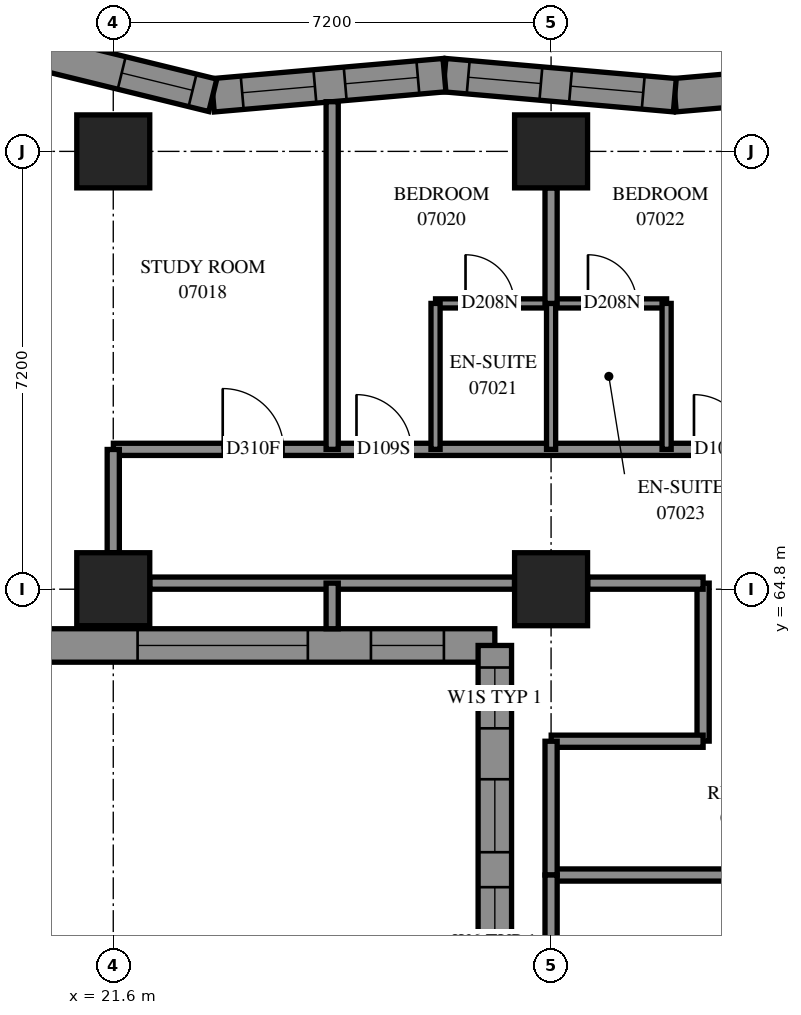
"""IFC4 building model, lengths in metres.
Left out: names, types, materials, properties, quantities, classifications, styles, units other than length and angle.
Written with IfcOpenShell. Run it as: python <this file> out.ifc"""

import sys

from ifc_helpers import new_model, si_unit, direction, frame, frame_2d, origin, origin_2d, place, context, subcontext, project, spatial, polyline, rectangle, outline, extrude, element, fill, save


model = new_model("IFC4")
c1 = context("Model", 3, precision=1e-05, world=origin(), true_north=direction((0.0, 1.0)))
c2 = subcontext(c1, "Body", "Model", "MODEL_VIEW")
j1 = project(units=[si_unit("LENGTHUNIT", "METRE"), si_unit("PLANEANGLEUNIT", "RADIAN")], contexts=[c1])
p1 = place(None, origin())
s1 = spatial("IfcSite", under=j1, at=p1, CompositionType="ELEMENT")
p2 = place(p1, origin())
s2 = spatial("IfcBuilding", under=s1, at=p2, CompositionType="ELEMENT")
p3 = place(p2, frame((0.0, 0.0, 30.4)))
s3 = spatial("IfcBuildingStorey", under=s2, at=p3, CompositionType="ELEMENT", Elevation=30.4)
for number, where, z_axis, x_axis in (
    (1, (21.6, 64.8, 0.0), (0.0, 0.0, 1.0), (1.0, 0.0, 0.0)),
    (2, (21.6, 72.0, 0.0), (0.0, 0.0, 1.0), (1.0, 0.0, 0.0)),
    (3, (28.8, 64.8, 0.0), (0.0, 0.0, 1.0), (1.0, 0.0, 0.0)),
    (4, (28.8, 72.0, 0.0), (0.0, 0.0, 1.0), (1.0, 0.0, 0.0)),
):
    element("IfcColumn", number, at=place(p3, frame(where, z_axis=z_axis, x_axis=x_axis)), inside=s3, PredefinedType="COLUMN", context=c2, shape_type="SweptSolid", body=[
        extrude(rectangle(XDim=1.2, YDim=1.2, at=origin_2d()), origin(), (0.0, 0.0, 1.0), 3.1),
    ])
p4 = place(p3, frame((34.623, 73.254, 0.0), z_axis=(0.0, 0.0, 1.0), x_axis=(-0.9962273538, -0.0867816769, 0.0)))
e5 = element("IfcWall", 5, at=p4, inside=s3, PredefinedType="SOLIDWALL", context=c2, shape_type="SweptSolid", body=[
    extrude(outline(polyline([(-0.024, -0.275), (3.779, -0.275), (3.827, 0.275), (0.024, 0.275), (-0.024, -0.275)])), origin(), (0.0, 0.0, 1.0), 3.1),
])
p5 = place(p4, frame((0.628, 0.0, 0.5)))
e6 = element("IfcOpeningElement", 6, at=p5, cuts=e5, PredefinedType="OPENING", context=c2, shape_type="SweptSolid", body=[
    extrude(rectangle(XDim=1.2, YDim=2.45, at=frame_2d((0.6, 1.225))), frame((0.0, 0.285, 0.0), z_axis=(0.0, -1.0, 0.0), x_axis=(1.0, 0.0, 0.0)), (0.0, 0.0, 1.0), 0.57),
])
p6 = place(p3, frame((30.835, 72.924, 0.0), z_axis=(0.0, 0.0, 1.0), x_axis=(-0.9962273538, 0.0867816769, 0.0)))
e7 = element("IfcWall", 7, at=p6, inside=s3, PredefinedType="SOLIDWALL", context=c2, shape_type="SweptSolid", body=[
    extrude(outline(polyline([(0.024, -0.275), (3.827, -0.275), (3.779, 0.275), (-0.024, 0.275), (0.024, -0.275)])), origin(), (0.0, 0.0, 1.0), 3.1),
])
p7 = place(p6, frame((0.521, 0.0, 0.5)))
e8 = element("IfcOpeningElement", 8, at=p7, cuts=e7, PredefinedType="OPENING", context=c2, shape_type="SweptSolid", body=[
    extrude(rectangle(XDim=1.2, YDim=2.45, at=frame_2d((0.6, 1.225))), frame((0.0, 0.285, 0.0), z_axis=(0.0, -1.0, 0.0), x_axis=(1.0, 0.0, 0.0)), (0.0, 0.0, 1.0), 0.57),
])
p8 = place(p6, frame((2.211, 0.0, 0.5)))
e9 = element("IfcOpeningElement", 9, at=p8, cuts=e7, PredefinedType="OPENING", context=c2, shape_type="SweptSolid", body=[
    extrude(rectangle(XDim=1.2, YDim=2.45, at=frame_2d((0.6, 1.225))), frame((0.0, 0.285, 0.0), z_axis=(0.0, -1.0, 0.0), x_axis=(1.0, 0.0, 0.0)), (0.0, 0.0, 1.0), 0.57),
])
p9 = place(p3, frame((27.047, 73.254, 0.0), z_axis=(0.0, 0.0, 1.0), x_axis=(-0.9962263466, -0.0867932393, 0.0)))
e10 = element("IfcWall", 10, at=p9, inside=s3, PredefinedType="SOLIDWALL", context=c2, shape_type="SweptSolid", body=[
    extrude(outline(polyline([(-0.024, -0.275), (3.779, -0.275), (3.87, 0.275), (0.024, 0.275), (-0.024, -0.275)])), origin(), (0.0, 0.0, 1.0), 3.1),
])
p10 = place(p9, frame((0.439, 0.0, 0.5)))
e11 = element("IfcOpeningElement", 11, at=p10, cuts=e10, PredefinedType="OPENING", context=c2, shape_type="SweptSolid", body=[
    extrude(rectangle(XDim=1.2, YDim=2.45, at=frame_2d((0.6, 1.225))), frame((0.0, 0.285, 0.0), z_axis=(0.0, -1.0, 0.0), x_axis=(1.0, 0.0, 0.0)), (0.0, 0.0, 1.0), 0.57),
])
p11 = place(p9, frame((2.139, 0.0, 0.5)))
e12 = element("IfcOpeningElement", 12, at=p11, cuts=e10, PredefinedType="OPENING", context=c2, shape_type="SweptSolid", body=[
    extrude(rectangle(XDim=1.2, YDim=2.45, at=frame_2d((0.6, 1.225))), frame((0.0, 0.285, 0.0), z_axis=(0.0, -1.0, 0.0), x_axis=(1.0, 0.0, 0.0)), (0.0, 0.0, 1.0), 0.57),
])
p12 = place(p3, frame((23.237, 72.922, 0.0), z_axis=(0.0, 0.0, 1.0), x_axis=(-0.9711660271, 0.2384041692, 0.0)))
e13 = element("IfcWall", 13, at=p12, inside=s3, PredefinedType="SOLIDWALL", context=c2, shape_type="SweptSolid", body=[
    extrude(outline(polyline([(0.045, -0.275), (3.946, -0.275), (3.245, 0.275), (-0.045, 0.275), (0.045, -0.275)])), origin(), (0.0, 0.0, 1.0), 3.1),
])
p13 = place(p12, frame((0.343, 0.0, 0.5)))
e14 = element("IfcOpeningElement", 14, at=p13, cuts=e13, PredefinedType="OPENING", context=c2, shape_type="SweptSolid", body=[
    extrude(rectangle(XDim=1.2, YDim=2.45, at=frame_2d((0.6, 1.225))), frame((0.0, 0.285, 0.0), z_axis=(0.0, -1.0, 0.0), x_axis=(1.0, 0.0, 0.0)), (0.0, 0.0, 1.0), 0.57),
])
p14 = place(p3, frame((19.745, 63.875, 0.0), z_axis=(0.0, 0.0, 1.0), x_axis=(1.0, 0.0, 0.0)))
e15 = element("IfcWall", 15, at=p14, inside=s3, PredefinedType="SOLIDWALL", context=c2, shape_type="SweptSolid", body=[
    extrude(outline(polyline([(-0.275, -0.275), (7.855, -0.275), (8.405, 0.275), (0.275, 0.275), (-0.275, -0.275)])), origin(), (0.0, 0.0, 1.0), 3.1),
])
p15 = place(p14, frame((2.255, 0.0, 0.5)))
e16 = element("IfcOpeningElement", 16, at=p15, cuts=e15, PredefinedType="OPENING", context=c2, shape_type="SweptSolid", body=[
    extrude(rectangle(XDim=2.8, YDim=2.45, at=frame_2d((1.4, 1.225))), frame((0.0, 0.285, 0.0), z_axis=(0.0, -1.0, 0.0), x_axis=(1.0, 0.0, 0.0)), (0.0, 0.0, 1.0), 0.57),
])
p16 = place(p14, frame((6.093, 0.0, 0.5)))
e17 = element("IfcOpeningElement", 17, at=p16, cuts=e15, PredefinedType="OPENING", context=c2, shape_type="SweptSolid", body=[
    extrude(rectangle(XDim=1.2, YDim=2.45, at=frame_2d((0.6, 1.225))), frame((0.0, 0.285, 0.0), z_axis=(0.0, -1.0, 0.0), x_axis=(1.0, 0.0, 0.0)), (0.0, 0.0, 1.0), 0.57),
])
p17 = place(p3, frame((27.875, 63.875, 0.0), z_axis=(0.0, 0.0, 1.0), x_axis=(0.0, -1.0, 0.0)))
e18 = element("IfcWall", 18, at=p17, inside=s3, PredefinedType="SOLIDWALL", context=c2, shape_type="SweptSolid", body=[
    extrude(outline(polyline([(0.275, -0.275), (7.475, -0.275), (6.925, 0.275), (-0.275, 0.275), (0.275, -0.275)])), origin(), (0.0, 0.0, 1.0), 3.1),
])
p18 = place(p17, frame((3.975, 0.0, 0.7)))
e19 = element("IfcOpeningElement", 19, at=p18, cuts=e18, PredefinedType="OPENING", context=c2, shape_type="SweptSolid", body=[
    extrude(rectangle(XDim=1.8, YDim=2.2, at=frame_2d((0.9, 1.1))), frame((0.0, 0.285, 0.0), z_axis=(0.0, -1.0, 0.0), x_axis=(1.0, 0.0, 0.0)), (0.0, 0.0, 1.0), 0.57),
])
p19 = place(p17, frame((0.362, 0.0, 0.45)))
e20 = element("IfcOpeningElement", 20, at=p19, cuts=e18, PredefinedType="OPENING", context=c2, shape_type="SweptSolid", body=[
    extrude(rectangle(XDim=1.0, YDim=2.5, at=frame_2d((0.5, 1.25))), frame((0.0, 0.285, 0.0), z_axis=(0.0, -1.0, 0.0), x_axis=(1.0, 0.0, 0.0)), (0.0, 0.0, 1.0), 0.57),
])
p20 = place(p17, frame((2.2, 0.0, 0.5)))
e21 = element("IfcOpeningElement", 21, at=p20, cuts=e18, PredefinedType="OPENING", context=c2, shape_type="SweptSolid", body=[
    extrude(rectangle(XDim=1.2, YDim=2.45, at=frame_2d((0.6, 1.225))), frame((0.0, 0.285, 0.0), z_axis=(0.0, -1.0, 0.0), x_axis=(1.0, 0.0, 0.0)), (0.0, 0.0, 1.0), 0.57),
])
p21 = place(p3, frame((28.8, 60.1, 0.0), z_axis=(0.0, 0.0, 1.0), x_axis=(1.0, 0.0, 0.0)))
e22 = element("IfcWall", 22, at=p21, inside=s3, PredefinedType="PARTITIONING", context=c2, shape_type="SweptSolid", body=[
    extrude(rectangle(XDim=24.1, YDim=0.2, at=frame_2d((12.05, 0.0))), origin(), (0.0, 0.0, 1.0), 3.1),
])
p22 = place(p21, frame((4.125, 0.0, 0.0)))
e23 = element("IfcOpeningElement", 23, at=p22, cuts=e22, PredefinedType="OPENING", context=c2, shape_type="SweptSolid", body=[
    extrude(rectangle(XDim=1.0, YDim=2.1, at=frame_2d((0.5, 1.05))), frame((0.0, 0.11, 0.0), z_axis=(0.0, -1.0, 0.0), x_axis=(1.0, 0.0, 0.0)), (0.0, 0.0, 1.0), 0.22),
])
p23 = place(p21, frame((11.62, 0.0, 0.0)))
e24 = element("IfcOpeningElement", 24, at=p23, cuts=e22, PredefinedType="OPENING", context=c2, shape_type="SweptSolid", body=[
    extrude(rectangle(XDim=0.9, YDim=2.1, at=frame_2d((0.45, 1.05))), frame((0.0, 0.11, 0.0), z_axis=(0.0, -1.0, 0.0), x_axis=(1.0, 0.0, 0.0)), (0.0, 0.0, 1.0), 0.22),
])
p24 = place(p21, frame((14.8, 0.0, 0.0)))
e25 = element("IfcOpeningElement", 25, at=p24, cuts=e22, PredefinedType="OPENING", context=c2, shape_type="SweptSolid", body=[
    extrude(rectangle(XDim=0.9, YDim=2.1, at=frame_2d((0.45, 1.05))), frame((0.0, 0.11, 0.0), z_axis=(0.0, -1.0, 0.0), x_axis=(1.0, 0.0, 0.0)), (0.0, 0.0, 1.0), 0.22),
])
p25 = place(p21, frame((18.835, 0.0, 0.0)))
e26 = element("IfcOpeningElement", 26, at=p25, cuts=e22, PredefinedType="OPENING", context=c2, shape_type="SweptSolid", body=[
    extrude(rectangle(XDim=1.0, YDim=2.1, at=frame_2d((0.5, 1.05))), frame((0.0, 0.11, 0.0), z_axis=(0.0, -1.0, 0.0), x_axis=(1.0, 0.0, 0.0)), (0.0, 0.0, 1.0), 0.22),
])
p26 = place(p21, frame((22.854, 0.0, 0.0)))
e27 = element("IfcOpeningElement", 27, at=p26, cuts=e22, PredefinedType="OPENING", context=c2, shape_type="SweptSolid", body=[
    extrude(rectangle(XDim=1.0, YDim=2.1, at=frame_2d((0.5, 1.05))), frame((0.0, 0.11, 0.0), z_axis=(0.0, -1.0, 0.0), x_axis=(1.0, 0.0, 0.0)), (0.0, 0.0, 1.0), 0.22),
])
p27 = place(p3, frame((21.602, 67.1, 0.0), z_axis=(0.0, 0.0, 1.0), x_axis=(1.0, 0.0, 0.0)))
e28 = element("IfcWall", 28, at=p27, inside=s3, PredefinedType="PARTITIONING", context=c2, shape_type="SweptSolid", body=[
    extrude(rectangle(XDim=11.898, YDim=0.2, at=frame_2d((5.949, 0.0))), origin(), (0.0, 0.0, 1.0), 3.1),
])
p28 = place(p27, frame((1.798, 0.0, 0.0)))
e29 = element("IfcOpeningElement", 29, at=p28, cuts=e28, PredefinedType="OPENING", context=c2, shape_type="SweptSolid", body=[
    extrude(rectangle(XDim=1.0, YDim=2.1, at=frame_2d((0.5, 1.05))), frame((0.0, 0.11, 0.0), z_axis=(0.0, -1.0, 0.0), x_axis=(1.0, 0.0, 0.0)), (0.0, 0.0, 1.0), 0.22),
])
p29 = place(p27, frame((3.998, 0.0, 0.0)))
e30 = element("IfcOpeningElement", 30, at=p29, cuts=e28, PredefinedType="OPENING", context=c2, shape_type="SweptSolid", body=[
    extrude(rectangle(XDim=0.9, YDim=2.1, at=frame_2d((0.45, 1.05))), frame((0.0, 0.11, 0.0), z_axis=(0.0, -1.0, 0.0), x_axis=(1.0, 0.0, 0.0)), (0.0, 0.0, 1.0), 0.22),
])
p30 = place(p27, frame((9.548, 0.0, 0.0)))
e31 = element("IfcOpeningElement", 31, at=p30, cuts=e28, PredefinedType="OPENING", context=c2, shape_type="SweptSolid", body=[
    extrude(rectangle(XDim=0.9, YDim=2.1, at=frame_2d((0.45, 1.05))), frame((0.0, 0.11, 0.0), z_axis=(0.0, -1.0, 0.0), x_axis=(1.0, 0.0, 0.0)), (0.0, 0.0, 1.0), 0.22),
])
p31 = place(p3, frame((22.2, 64.9, 0.0), z_axis=(0.0, 0.0, 1.0), x_axis=(1.0, 0.0, 0.0)))
e32 = element("IfcWall", 32, at=p31, inside=s3, PredefinedType="PARTITIONING", context=c2, shape_type="SweptSolid", body=[
    extrude(rectangle(XDim=6.0, YDim=0.2, at=frame_2d((3.0, 0.0))), origin(), (0.0, 0.0, 1.0), 2.6),
])
p32 = place(p3, frame((25.2, 67.1, 0.0), z_axis=(0.0, 0.0, 1.0), x_axis=(0.0, 1.0, 0.0)))
e33 = element("IfcWall", 33, at=p32, inside=s3, PredefinedType="PARTITIONING", context=c2, shape_type="SweptSolid", body=[
    extrude(rectangle(XDim=5.717, YDim=0.2, at=frame_2d((2.859, 0.0))), origin(), (0.0, 0.0, 1.0), 3.1),
])
p33 = place(p3, frame((26.9, 69.5, 0.0), z_axis=(0.0, 0.0, 1.0), x_axis=(1.0, 0.0, 0.0)))
e34 = element("IfcWall", 34, at=p33, inside=s3, PredefinedType="PARTITIONING", context=c2, shape_type="SweptSolid", body=[
    extrude(rectangle(XDim=3.8, YDim=0.15, at=frame_2d((1.9, 0.0))), origin(), (0.0, 0.0, 1.0), 3.1),
])
p34 = place(p33, frame((0.493, 0.0, 0.0)))
e35 = element("IfcOpeningElement", 35, at=p34, cuts=e34, PredefinedType="OPENING", context=c2, shape_type="SweptSolid", body=[
    extrude(rectangle(XDim=0.8, YDim=2.1, at=frame_2d((0.4, 1.05))), frame((0.0, 0.085, 0.0), z_axis=(0.0, -1.0, 0.0), x_axis=(1.0, 0.0, 0.0)), (0.0, 0.0, 1.0), 0.17),
])
p35 = place(p33, frame((2.507, 0.0, 0.0)))
e36 = element("IfcOpeningElement", 36, at=p35, cuts=e34, PredefinedType="OPENING", context=c2, shape_type="SweptSolid", body=[
    extrude(rectangle(XDim=0.8, YDim=2.1, at=frame_2d((0.4, 1.05))), frame((0.0, 0.085, 0.0), z_axis=(0.0, -1.0, 0.0), x_axis=(1.0, 0.0, 0.0)), (0.0, 0.0, 1.0), 0.17),
])
p36 = place(p3, frame((31.3, 62.302, 0.0), z_axis=(0.0, 0.0, 1.0), x_axis=(0.0, 1.0, 0.0)))
e37 = element("IfcWall", 37, at=p36, inside=s3, PredefinedType="PARTITIONING", context=c2, shape_type="SweptSolid", body=[
    extrude(rectangle(XDim=2.598, YDim=0.2, at=frame_2d((1.299, 0.0))), origin(), (0.0, 0.0, 1.0), 3.1),
])
p37 = place(p3, frame((28.802, 62.3, 0.0), z_axis=(0.0, 0.0, 1.0), x_axis=(1.0, 0.0, 0.0)))
e38 = element("IfcWall", 38, at=p37, inside=s3, PredefinedType="PARTITIONING", context=c2, shape_type="SweptSolid", body=[
    extrude(rectangle(XDim=2.498, YDim=0.2, at=frame_2d((1.249, 0.0))), origin(), (0.0, 0.0, 1.0), 3.1),
])
for number, where, z_axis, x_axis in (
    (39, (26.9, 67.1, 0.0), (0.0, 0.0, 1.0), (0.0, 1.0, 0.0)),
    (40, (28.8, 67.1, 0.0), (0.0, 0.0, 1.0), (0.0, 1.0, 0.0)),
    (41, (30.7, 67.1, 0.0), (0.0, 0.0, 1.0), (0.0, 1.0, 0.0)),
):
    element("IfcWall", number, at=place(p3, frame(where, z_axis=z_axis, x_axis=x_axis)), inside=s3, PredefinedType="PARTITIONING", context=c2, shape_type="SweptSolid", body=[
        extrude(rectangle(XDim=2.4, YDim=0.15, at=frame_2d((1.2, 0.0))), origin(), (0.0, 0.0, 1.0), 3.1),
    ])
p38 = place(p3, frame((28.8, 60.1, 0.0), z_axis=(0.0, 0.0, 1.0), x_axis=(0.0, 1.0, 0.0)))
e42 = element("IfcWall", 42, at=p38, inside=s3, PredefinedType="PARTITIONING", context=c2, shape_type="SweptSolid", body=[
    extrude(rectangle(XDim=2.2, YDim=0.2, at=frame_2d((1.1, 0.0))), origin(), (0.0, 0.0, 1.0), 2.6),
])
for number, where, z_axis, x_axis in (
    (43, (28.8, 69.5, 0.0), (0.0, 0.0, 1.0), (0.0, 1.0, 0.0)),
    (44, (29.4, 64.9, 0.0), (0.0, 0.0, 1.0), (1.0, 0.0, 0.0)),
):
    element("IfcWall", number, at=place(p3, frame(where, z_axis=z_axis, x_axis=x_axis)), inside=s3, PredefinedType="PARTITIONING", context=c2, shape_type="SweptSolid", body=[
        extrude(rectangle(XDim=1.9, YDim=0.2, at=frame_2d((0.95, 0.0))), origin(), (0.0, 0.0, 1.0), 3.1),
    ])
p39 = place(p3, frame((28.8, 58.2, 0.0), z_axis=(0.0, 0.0, 1.0), x_axis=(0.0, 1.0, 0.0)))
e45 = element("IfcWall", 45, at=p39, inside=s3, PredefinedType="PARTITIONING", context=c2, shape_type="SweptSolid", body=[
    extrude(rectangle(XDim=1.9, YDim=0.2, at=frame_2d((0.95, 0.0))), origin(), (0.0, 0.0, 1.0), 2.6),
])
p40 = place(p3, frame((21.6, 65.4, 0.0), z_axis=(0.0, 0.0, 1.0), x_axis=(0.0, 1.0, 0.0)))
e46 = element("IfcWall", 46, at=p40, inside=s3, PredefinedType="PARTITIONING", context=c2, shape_type="SweptSolid", body=[
    extrude(rectangle(XDim=1.698, YDim=0.2, at=frame_2d((0.849, 0.0))), origin(), (0.0, 0.0, 1.0), 2.6),
])
p41 = place(p3, frame((25.2, 64.15, 0.0), z_axis=(0.0, 0.0, 1.0), x_axis=(0.0, 1.0, 0.0)))
e47 = element("IfcWall", 47, at=p41, inside=s3, PredefinedType="PARTITIONING", context=c2, shape_type="SweptSolid", body=[
    extrude(rectangle(XDim=0.75, YDim=0.2, at=frame_2d((0.375, 0.0))), origin(), (0.0, 0.0, 1.0), 3.1),
])
p42 = place(p3, frame((28.2, 64.9, 0.0), z_axis=(0.0, 0.0, 1.0), x_axis=(1.0, 0.0, 0.0)))
e48 = element("IfcWall", 48, at=p42, inside=s3, PredefinedType="PARTITIONING", context=c2, shape_type="SweptSolid", body=[
    extrude(rectangle(XDim=1.2, YDim=0.2, at=frame_2d((0.6, 0.0))), origin(), (0.0, 0.0, 1.0), 3.1),
])
p43 = place(p7, origin())
e49 = element("IfcWindow", 49, at=p43, inside=s3, PartitioningType="SINGLE_PANEL", PredefinedType="WINDOW", context=c2, shape_type="SweptSolid", body=[
    extrude(rectangle(XDim=1.2, YDim=2.45, at=frame_2d((0.6, 1.225))), frame((0.0, 0.155, 0.0), z_axis=(0.0, -1.0, 0.0), x_axis=(1.0, 0.0, 0.0)), (0.0, 0.0, 1.0), 0.06),
])
fill(e8, e49)
p44 = place(p8, origin())
e50 = element("IfcWindow", 50, at=p44, inside=s3, PartitioningType="SINGLE_PANEL", PredefinedType="WINDOW", context=c2, shape_type="SweptSolid", body=[
    extrude(rectangle(XDim=1.2, YDim=2.45, at=frame_2d((0.6, 1.225))), frame((0.0, 0.155, 0.0), z_axis=(0.0, -1.0, 0.0), x_axis=(1.0, 0.0, 0.0)), (0.0, 0.0, 1.0), 0.06),
])
fill(e9, e50)
p45 = place(p10, origin())
e51 = element("IfcWindow", 51, at=p45, inside=s3, PartitioningType="SINGLE_PANEL", PredefinedType="WINDOW", context=c2, shape_type="SweptSolid", body=[
    extrude(rectangle(XDim=1.2, YDim=2.45, at=frame_2d((0.6, 1.225))), frame((0.0, 0.155, 0.0), z_axis=(0.0, -1.0, 0.0), x_axis=(1.0, 0.0, 0.0)), (0.0, 0.0, 1.0), 0.06),
])
fill(e11, e51)
p46 = place(p11, origin())
e52 = element("IfcWindow", 52, at=p46, inside=s3, PartitioningType="SINGLE_PANEL", PredefinedType="WINDOW", context=c2, shape_type="SweptSolid", body=[
    extrude(rectangle(XDim=1.2, YDim=2.45, at=frame_2d((0.6, 1.225))), frame((0.0, 0.155, 0.0), z_axis=(0.0, -1.0, 0.0), x_axis=(1.0, 0.0, 0.0)), (0.0, 0.0, 1.0), 0.06),
])
fill(e12, e52)
p47 = place(p13, origin())
e53 = element("IfcWindow", 53, at=p47, inside=s3, PartitioningType="SINGLE_PANEL", PredefinedType="WINDOW", context=c2, shape_type="SweptSolid", body=[
    extrude(rectangle(XDim=1.2, YDim=2.45, at=frame_2d((0.6, 1.225))), frame((0.0, 0.155, 0.0), z_axis=(0.0, -1.0, 0.0), x_axis=(1.0, 0.0, 0.0)), (0.0, 0.0, 1.0), 0.06),
])
fill(e14, e53)
p48 = place(p15, origin())
e54 = element("IfcWindow", 54, at=p48, inside=s3, PartitioningType="SINGLE_PANEL", PredefinedType="WINDOW", context=c2, shape_type="SweptSolid", body=[
    extrude(rectangle(XDim=2.8, YDim=2.45, at=frame_2d((1.4, 1.225))), frame((0.0, 0.155, 0.0), z_axis=(0.0, -1.0, 0.0), x_axis=(1.0, 0.0, 0.0)), (0.0, 0.0, 1.0), 0.06),
])
fill(e16, e54)
p49 = place(p16, origin())
e55 = element("IfcWindow", 55, at=p49, inside=s3, PartitioningType="SINGLE_PANEL", PredefinedType="WINDOW", context=c2, shape_type="SweptSolid", body=[
    extrude(rectangle(XDim=1.2, YDim=2.45, at=frame_2d((0.6, 1.225))), frame((0.0, 0.155, 0.0), z_axis=(0.0, -1.0, 0.0), x_axis=(1.0, 0.0, 0.0)), (0.0, 0.0, 1.0), 0.06),
])
fill(e17, e55)
p50 = place(p28, origin())
e56 = element("IfcDoor", 56, at=p50, inside=s3, OperationType="SINGLE_SWING_RIGHT", PredefinedType="DOOR", context=c2, shape_type="SweptSolid", body=[
    extrude(rectangle(XDim=1.0, YDim=2.1, at=frame_2d((0.5, 1.05))), frame((0.0, 0.025, 0.0), z_axis=(0.0, -1.0, 0.0), x_axis=(1.0, 0.0, 0.0)), (0.0, 0.0, 1.0), 0.05),
])
fill(e29, e56)
p51 = place(p29, origin())
e57 = element("IfcDoor", 57, at=p51, inside=s3, OperationType="SINGLE_SWING_LEFT", PredefinedType="DOOR", context=c2, shape_type="SweptSolid", body=[
    extrude(rectangle(XDim=0.9, YDim=2.1, at=frame_2d((0.45, 1.05))), frame((0.0, 0.025, 0.0), z_axis=(0.0, -1.0, 0.0), x_axis=(1.0, 0.0, 0.0)), (0.0, 0.0, 1.0), 0.05),
])
fill(e30, e57)
p52 = place(p34, origin())
e58 = element("IfcDoor", 58, at=p52, inside=s3, OperationType="SINGLE_SWING_RIGHT", PredefinedType="DOOR", context=c2, shape_type="SweptSolid", body=[
    extrude(rectangle(XDim=0.8, YDim=2.1, at=frame_2d((0.4, 1.05))), frame((0.0, 0.025, 0.0), z_axis=(0.0, -1.0, 0.0), x_axis=(1.0, 0.0, 0.0)), (0.0, 0.0, 1.0), 0.05),
])
fill(e35, e58)
p53 = place(p30, origin())
e59 = element("IfcDoor", 59, at=p53, inside=s3, OperationType="SINGLE_SWING_RIGHT", PredefinedType="DOOR", context=c2, shape_type="SweptSolid", body=[
    extrude(rectangle(XDim=0.9, YDim=2.1, at=frame_2d((0.45, 1.05))), frame((0.0, 0.025, 0.0), z_axis=(0.0, -1.0, 0.0), x_axis=(1.0, 0.0, 0.0)), (0.0, 0.0, 1.0), 0.05),
])
fill(e31, e59)
p54 = place(p35, origin())
e60 = element("IfcDoor", 60, at=p54, inside=s3, OperationType="SINGLE_SWING_RIGHT", PredefinedType="DOOR", context=c2, shape_type="SweptSolid", body=[
    extrude(rectangle(XDim=0.8, YDim=2.1, at=frame_2d((0.4, 1.05))), frame((0.0, 0.025, 0.0), z_axis=(0.0, -1.0, 0.0), x_axis=(1.0, 0.0, 0.0)), (0.0, 0.0, 1.0), 0.05),
])
fill(e36, e60)
p55 = place(p18, origin())
e61 = element("IfcWindow", 61, at=p55, inside=s3, PartitioningType="SINGLE_PANEL", PredefinedType="WINDOW", context=c2, shape_type="SweptSolid", body=[
    extrude(rectangle(XDim=1.8, YDim=2.2, at=frame_2d((0.9, 1.1))), frame((0.0, 0.155, 0.0), z_axis=(0.0, -1.0, 0.0), x_axis=(1.0, 0.0, 0.0)), (0.0, 0.0, 1.0), 0.06),
])
fill(e19, e61)
p56 = place(p19, origin())
e62 = element("IfcWindow", 62, at=p56, inside=s3, PartitioningType="SINGLE_PANEL", PredefinedType="WINDOW", context=c2, shape_type="SweptSolid", body=[
    extrude(rectangle(XDim=1.0, YDim=2.5, at=frame_2d((0.5, 1.25))), frame((0.0, 0.155, 0.0), z_axis=(0.0, -1.0, 0.0), x_axis=(1.0, 0.0, 0.0)), (0.0, 0.0, 1.0), 0.06),
])
fill(e20, e62)
p57 = place(p20, origin())
e63 = element("IfcWindow", 63, at=p57, inside=s3, PartitioningType="SINGLE_PANEL", PredefinedType="WINDOW", context=c2, shape_type="SweptSolid", body=[
    extrude(rectangle(XDim=1.2, YDim=2.45, at=frame_2d((0.6, 1.225))), frame((0.0, 0.155, 0.0), z_axis=(0.0, -1.0, 0.0), x_axis=(1.0, 0.0, 0.0)), (0.0, 0.0, 1.0), 0.06),
])
fill(e21, e63)
save(model, sys.argv[1])
